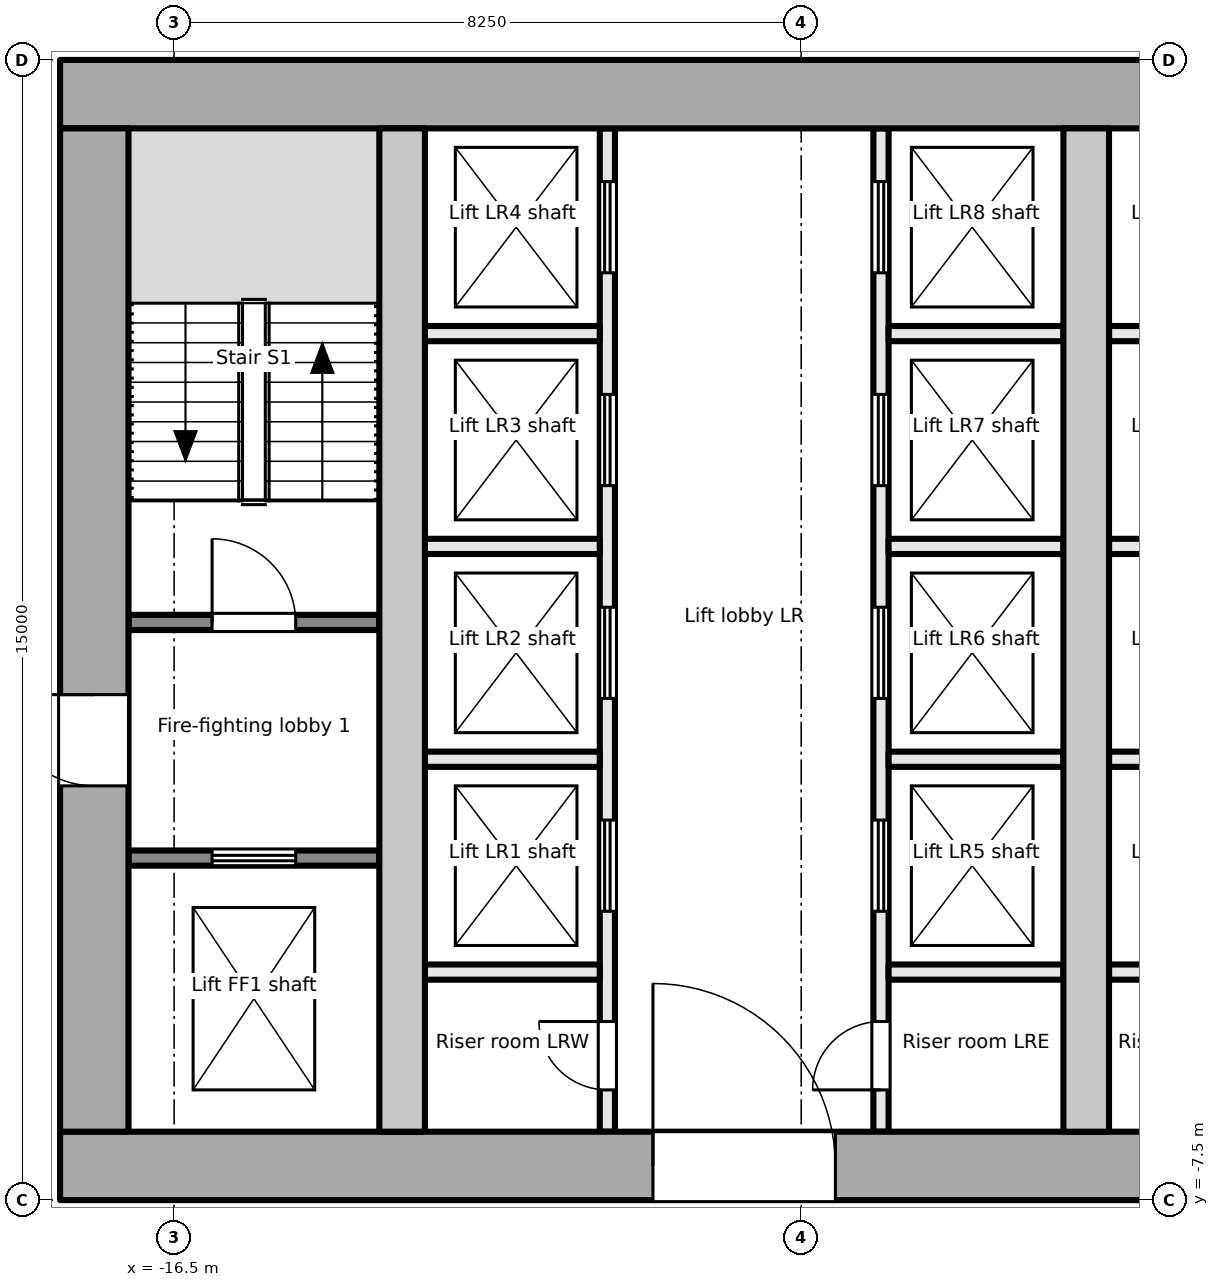
"""IFC4 building model, lengths in metres.
Left out: names, types, materials, properties, quantities, classifications, styles, units other than length and angle.
Written with IfcOpenShell. Run it as: python <this file> out.ifc"""

import sys

from ifc_helpers import new_model, si_unit, direction, frame, frame_2d, origin, place, context, subcontext, project, spatial, rectangle, extrude, element, fill, save


model = new_model("IFC4")
c1 = context("Model", 3, precision=1e-05, world=origin(), true_north=direction((0.0, 1.0)))
c2 = subcontext(c1, "Body", "Model", "MODEL_VIEW")
j1 = project(units=[si_unit("LENGTHUNIT", "METRE"), si_unit("PLANEANGLEUNIT", "RADIAN")], contexts=[c1])
p1 = place(None, origin())
s1 = spatial("IfcSite", under=j1, at=p1, CompositionType="ELEMENT")
p2 = place(p1, origin())
s2 = spatial("IfcBuilding", under=s1, at=p2, CompositionType="ELEMENT")
p3 = place(p2, frame((0.0, 0.0, 40.6)))
s3 = spatial("IfcBuildingStorey", under=s2, at=p3, CompositionType="ELEMENT", Elevation=40.6)
p4 = place(p3, frame((-18.0, -7.05, -0.2), z_axis=(0.0, 0.0, 1.0), x_axis=(1.0, 0.0, 0.0)))
e1 = element("IfcWall", 1, at=p4, inside=s3, PredefinedType="SHEAR", context=c2, shape_type="SweptSolid", body=[
    extrude(rectangle(XDim=36.0, YDim=0.9, at=frame_2d((18.0, 0.0))), origin(), (0.0, 0.0, 1.0), 4.1),
])
p5 = place(p4, frame((7.8, 0.0, 0.2)))
e2 = element("IfcOpeningElement", 2, at=p5, cuts=e1, PredefinedType="OPENING", context=c2, shape_type="SweptSolid", body=[
    extrude(rectangle(XDim=2.4, YDim=2.1, at=frame_2d((1.2, 1.05))), frame((0.0, 0.46, 0.0), z_axis=(0.0, -1.0, 0.0), x_axis=(1.0, 0.0, 0.0)), (0.0, 0.0, 1.0), 0.921),
])
p6 = place(p4, frame((17.4, 0.0, 0.2)))
e3 = element("IfcOpeningElement", 3, at=p6, cuts=e1, PredefinedType="OPENING", context=c2, shape_type="SweptSolid", body=[
    extrude(rectangle(XDim=1.2, YDim=2.1, at=frame_2d((0.6, 1.05))), frame((0.0, 0.46, 0.0), z_axis=(0.0, -1.0, 0.0), x_axis=(1.0, 0.0, 0.0)), (0.0, 0.0, 1.0), 0.921),
])
p7 = place(p4, frame((26.1, 0.0, 0.2)))
e4 = element("IfcOpeningElement", 4, at=p7, cuts=e1, PredefinedType="OPENING", context=c2, shape_type="SweptSolid", body=[
    extrude(rectangle(XDim=2.4, YDim=2.1, at=frame_2d((1.2, 1.05))), frame((0.0, 0.46, 0.0), z_axis=(0.0, -1.0, 0.0), x_axis=(1.0, 0.0, 0.0)), (0.0, 0.0, 1.0), 0.921),
])
p8 = place(p3, frame((-18.0, 7.05, -0.2), z_axis=(0.0, 0.0, 1.0), x_axis=(1.0, 0.0, 0.0)))
e5 = element("IfcWall", 5, at=p8, inside=s3, PredefinedType="SHEAR", context=c2, shape_type="SweptSolid", body=[
    extrude(rectangle(XDim=36.0, YDim=0.9, at=frame_2d((18.0, 0.0))), origin(), (0.0, 0.0, 1.0), 4.1),
])
p9 = place(p3, frame((-17.55, -6.6, -0.2), z_axis=(0.0, 0.0, 1.0), x_axis=(0.0, 1.0, 0.0)))
e6 = element("IfcWall", 6, at=p9, inside=s3, PredefinedType="SHEAR", context=c2, shape_type="SweptSolid", body=[
    extrude(rectangle(XDim=13.2, YDim=0.9, at=frame_2d((6.6, 0.0))), origin(), (0.0, 0.0, 1.0), 4.1),
])
p10 = place(p9, frame((4.55, 0.0, 0.2)))
e7 = element("IfcOpeningElement", 7, at=p10, cuts=e6, PredefinedType="OPENING", context=c2, shape_type="SweptSolid", body=[
    extrude(rectangle(XDim=1.2, YDim=2.1, at=frame_2d((0.6, 1.05))), frame((0.0, 0.46, 0.0), z_axis=(0.0, -1.0, 0.0), x_axis=(1.0, 0.0, 0.0)), (0.0, 0.0, 1.0), 0.921),
])
for number, where, z_axis, x_axis in (
    (8, (-13.5, -6.6, -0.2), (0.0, 0.0, 1.0), (0.0, 1.0, 0.0)),
    (9, (-4.5, -6.6, -0.2), (0.0, 0.0, 1.0), (0.0, 1.0, 0.0)),
):
    element("IfcWall", number, at=place(p3, frame(where, z_axis=z_axis, x_axis=x_axis)), inside=s3, PredefinedType="SHEAR", context=c2, shape_type="SweptSolid", body=[
        extrude(rectangle(XDim=13.2, YDim=0.6, at=frame_2d((6.6, 0.0))), origin(), (0.0, 0.0, 1.0), 4.1),
    ])
p11 = place(p3, frame((-17.1, -3.0, 0.0), z_axis=(0.0, 0.0, 1.0), x_axis=(1.0, 0.0, 0.0)))
e10 = element("IfcWall", 10, at=p11, inside=s3, PredefinedType="PARTITIONING", context=c2, shape_type="SweptSolid", body=[
    extrude(rectangle(XDim=3.3, YDim=0.2, at=frame_2d((1.65, 0.0))), origin(), (0.0, 0.0, 1.0), 3.9),
])
p12 = place(p11, frame((1.1, 0.0, 0.0)))
e11 = element("IfcOpeningElement", 11, at=p12, cuts=e10, PredefinedType="OPENING", context=c2, shape_type="SweptSolid", body=[
    extrude(rectangle(XDim=1.1, YDim=2.1, at=frame_2d((0.55, 1.05))), frame((0.0, 0.111, 0.0), z_axis=(0.0, -1.0, 0.0), x_axis=(1.0, 0.0, 0.0)), (0.0, 0.0, 1.0), 0.221),
])
p13 = place(p3, frame((-17.1, 0.1, 0.0), z_axis=(0.0, 0.0, 1.0), x_axis=(1.0, 0.0, 0.0)))
e12 = element("IfcWall", 12, at=p13, inside=s3, PredefinedType="PARTITIONING", context=c2, shape_type="SweptSolid", body=[
    extrude(rectangle(XDim=3.3, YDim=0.2, at=frame_2d((1.65, 0.0))), origin(), (0.0, 0.0, 1.0), 3.9),
])
p14 = place(p13, frame((1.1, 0.0, 0.0)))
e13 = element("IfcOpeningElement", 13, at=p14, cuts=e12, PredefinedType="OPENING", context=c2, shape_type="SweptSolid", body=[
    extrude(rectangle(XDim=1.1, YDim=2.1, at=frame_2d((0.55, 1.05))), frame((0.0, 0.111, 0.0), z_axis=(0.0, -1.0, 0.0), x_axis=(1.0, 0.0, 0.0)), (0.0, 0.0, 1.0), 0.221),
])
p15 = place(p3, frame((-10.8, -6.6, 0.0), z_axis=(0.0, 0.0, 1.0), x_axis=(0.0, 1.0, 0.0)))
e14 = element("IfcWall", 14, at=p15, inside=s3, PredefinedType="PARTITIONING", context=c2, shape_type="SweptSolid", body=[
    extrude(rectangle(XDim=13.2, YDim=0.2, at=frame_2d((6.6, 0.0))), origin(), (0.0, 0.0, 1.0), 3.9),
])
p16 = place(p15, frame((0.55, 0.0, 0.0)))
e15 = element("IfcOpeningElement", 15, at=p16, cuts=e14, PredefinedType="OPENING", context=c2, shape_type="SweptSolid", body=[
    extrude(rectangle(XDim=0.9, YDim=2.1, at=frame_2d((0.45, 1.05))), frame((0.0, 0.111, 0.0), z_axis=(0.0, -1.0, 0.0), x_axis=(1.0, 0.0, 0.0)), (0.0, 0.0, 1.0), 0.221),
])
p17 = place(p15, frame((2.9, 0.0, 0.0)))
e16 = element("IfcOpeningElement", 16, at=p17, cuts=e14, PredefinedType="OPENING", context=c2, shape_type="SweptSolid", body=[
    extrude(rectangle(XDim=1.2, YDim=2.1, at=frame_2d((0.6, 1.05))), frame((0.0, 0.111, 0.0), z_axis=(0.0, -1.0, 0.0), x_axis=(1.0, 0.0, 0.0)), (0.0, 0.0, 1.0), 0.221),
])
p18 = place(p15, frame((5.7, 0.0, 0.0)))
e17 = element("IfcOpeningElement", 17, at=p18, cuts=e14, PredefinedType="OPENING", context=c2, shape_type="SweptSolid", body=[
    extrude(rectangle(XDim=1.2, YDim=2.1, at=frame_2d((0.6, 1.05))), frame((0.0, 0.111, 0.0), z_axis=(0.0, -1.0, 0.0), x_axis=(1.0, 0.0, 0.0)), (0.0, 0.0, 1.0), 0.221),
])
p19 = place(p15, frame((8.5, 0.0, 0.0)))
e18 = element("IfcOpeningElement", 18, at=p19, cuts=e14, PredefinedType="OPENING", context=c2, shape_type="SweptSolid", body=[
    extrude(rectangle(XDim=1.2, YDim=2.1, at=frame_2d((0.6, 1.05))), frame((0.0, 0.111, 0.0), z_axis=(0.0, -1.0, 0.0), x_axis=(1.0, 0.0, 0.0)), (0.0, 0.0, 1.0), 0.221),
])
p20 = place(p15, frame((11.3, 0.0, 0.0)))
e19 = element("IfcOpeningElement", 19, at=p20, cuts=e14, PredefinedType="OPENING", context=c2, shape_type="SweptSolid", body=[
    extrude(rectangle(XDim=1.2, YDim=2.1, at=frame_2d((0.6, 1.05))), frame((0.0, 0.111, 0.0), z_axis=(0.0, -1.0, 0.0), x_axis=(1.0, 0.0, 0.0)), (0.0, 0.0, 1.0), 0.221),
])
p21 = place(p3, frame((-7.2, -6.6, 0.0), z_axis=(0.0, 0.0, 1.0), x_axis=(0.0, 1.0, 0.0)))
e20 = element("IfcWall", 20, at=p21, inside=s3, PredefinedType="PARTITIONING", context=c2, shape_type="SweptSolid", body=[
    extrude(rectangle(XDim=13.2, YDim=0.2, at=frame_2d((6.6, 0.0))), origin(), (0.0, 0.0, 1.0), 3.9),
])
p22 = place(p21, frame((0.55, 0.0, 0.0)))
e21 = element("IfcOpeningElement", 21, at=p22, cuts=e20, PredefinedType="OPENING", context=c2, shape_type="SweptSolid", body=[
    extrude(rectangle(XDim=0.9, YDim=2.1, at=frame_2d((0.45, 1.05))), frame((0.0, 0.111, 0.0), z_axis=(0.0, -1.0, 0.0), x_axis=(1.0, 0.0, 0.0)), (0.0, 0.0, 1.0), 0.221),
])
p23 = place(p21, frame((2.9, 0.0, 0.0)))
e22 = element("IfcOpeningElement", 22, at=p23, cuts=e20, PredefinedType="OPENING", context=c2, shape_type="SweptSolid", body=[
    extrude(rectangle(XDim=1.2, YDim=2.1, at=frame_2d((0.6, 1.05))), frame((0.0, 0.111, 0.0), z_axis=(0.0, -1.0, 0.0), x_axis=(1.0, 0.0, 0.0)), (0.0, 0.0, 1.0), 0.221),
])
p24 = place(p21, frame((5.7, 0.0, 0.0)))
e23 = element("IfcOpeningElement", 23, at=p24, cuts=e20, PredefinedType="OPENING", context=c2, shape_type="SweptSolid", body=[
    extrude(rectangle(XDim=1.2, YDim=2.1, at=frame_2d((0.6, 1.05))), frame((0.0, 0.111, 0.0), z_axis=(0.0, -1.0, 0.0), x_axis=(1.0, 0.0, 0.0)), (0.0, 0.0, 1.0), 0.221),
])
p25 = place(p21, frame((8.5, 0.0, 0.0)))
e24 = element("IfcOpeningElement", 24, at=p25, cuts=e20, PredefinedType="OPENING", context=c2, shape_type="SweptSolid", body=[
    extrude(rectangle(XDim=1.2, YDim=2.1, at=frame_2d((0.6, 1.05))), frame((0.0, 0.111, 0.0), z_axis=(0.0, -1.0, 0.0), x_axis=(1.0, 0.0, 0.0)), (0.0, 0.0, 1.0), 0.221),
])
p26 = place(p21, frame((11.3, 0.0, 0.0)))
e25 = element("IfcOpeningElement", 25, at=p26, cuts=e20, PredefinedType="OPENING", context=c2, shape_type="SweptSolid", body=[
    extrude(rectangle(XDim=1.2, YDim=2.1, at=frame_2d((0.6, 1.05))), frame((0.0, 0.111, 0.0), z_axis=(0.0, -1.0, 0.0), x_axis=(1.0, 0.0, 0.0)), (0.0, 0.0, 1.0), 0.221),
])
for number, where, z_axis, x_axis in (
    (26, (-13.2, -1.7, 0.0), (0.0, 0.0, 1.0), (1.0, 0.0, 0.0)),
    (27, (-13.2, 1.1, 0.0), (0.0, 0.0, 1.0), (1.0, 0.0, 0.0)),
    (28, (-13.2, 3.9, 0.0), (0.0, 0.0, 1.0), (1.0, 0.0, 0.0)),
    (29, (-13.2, -4.5, 0.0), (0.0, 0.0, 1.0), (1.0, 0.0, 0.0)),
    (30, (-7.1, -1.7, 0.0), (0.0, 0.0, 1.0), (1.0, 0.0, 0.0)),
    (31, (-7.1, 1.1, 0.0), (0.0, 0.0, 1.0), (1.0, 0.0, 0.0)),
    (32, (-7.1, 3.9, 0.0), (0.0, 0.0, 1.0), (1.0, 0.0, 0.0)),
    (33, (-7.1, -4.5, 0.0), (0.0, 0.0, 1.0), (1.0, 0.0, 0.0)),
    (34, (-4.2, -1.7, 0.0), (0.0, 0.0, 1.0), (1.0, 0.0, 0.0)),
    (35, (-4.2, 1.1, 0.0), (0.0, 0.0, 1.0), (1.0, 0.0, 0.0)),
    (36, (-4.2, 3.9, 0.0), (0.0, 0.0, 1.0), (1.0, 0.0, 0.0)),
    (37, (-4.2, -4.5, 0.0), (0.0, 0.0, 1.0), (1.0, 0.0, 0.0)),
):
    element("IfcWall", number, at=place(p3, frame(where, z_axis=z_axis, x_axis=x_axis)), inside=s3, PredefinedType="PARTITIONING", context=c2, shape_type="SweptSolid", body=[
        extrude(rectangle(XDim=2.3, YDim=0.2, at=frame_2d((1.15, 0.0))), origin(), (0.0, 0.0, 1.0), 3.9),
    ])
p27 = place(p12, origin())
e38 = element("IfcDoor", 38, at=p27, inside=s3, OperationType="DOUBLE_DOOR_SLIDING", PredefinedType="DOOR", context=c2, shape_type="SweptSolid", body=[
    extrude(rectangle(XDim=1.1, YDim=2.1, at=frame_2d((0.55, 1.05))), frame((0.0, 0.025, 0.0), z_axis=(0.0, -1.0, 0.0), x_axis=(1.0, 0.0, 0.0)), (0.0, 0.0, 1.0), 0.05),
])
fill(e11, e38)
p28 = place(p10, origin())
e39 = element("IfcDoor", 39, at=p28, inside=s3, OperationType="SINGLE_SWING_RIGHT", PredefinedType="DOOR", context=c2, shape_type="SweptSolid", body=[
    extrude(rectangle(XDim=1.2, YDim=2.1, at=frame_2d((0.6, 1.05))), frame((0.0, 0.025, 0.0), z_axis=(0.0, -1.0, 0.0), x_axis=(1.0, 0.0, 0.0)), (0.0, 0.0, 1.0), 0.05),
])
fill(e7, e39)
p29 = place(p14, origin())
e40 = element("IfcDoor", 40, at=p29, inside=s3, OperationType="SINGLE_SWING_LEFT", PredefinedType="DOOR", context=c2, shape_type="SweptSolid", body=[
    extrude(rectangle(XDim=1.1, YDim=2.1, at=frame_2d((0.55, 1.05))), frame((0.0, 0.025, 0.0), z_axis=(0.0, -1.0, 0.0), x_axis=(1.0, 0.0, 0.0)), (0.0, 0.0, 1.0), 0.05),
])
fill(e13, e40)
p30 = place(p16, origin())
e41 = element("IfcDoor", 41, at=p30, inside=s3, OperationType="SINGLE_SWING_RIGHT", PredefinedType="DOOR", context=c2, shape_type="SweptSolid", body=[
    extrude(rectangle(XDim=0.9, YDim=2.1, at=frame_2d((0.45, 1.05))), frame((0.0, 0.025, 0.0), z_axis=(0.0, -1.0, 0.0), x_axis=(1.0, 0.0, 0.0)), (0.0, 0.0, 1.0), 0.05),
])
fill(e15, e41)
p31 = place(p17, origin())
e42 = element("IfcDoor", 42, at=p31, inside=s3, OperationType="DOUBLE_DOOR_SLIDING", PredefinedType="DOOR", context=c2, shape_type="SweptSolid", body=[
    extrude(rectangle(XDim=1.2, YDim=2.1, at=frame_2d((0.6, 1.05))), frame((0.0, 0.025, 0.0), z_axis=(0.0, -1.0, 0.0), x_axis=(1.0, 0.0, 0.0)), (0.0, 0.0, 1.0), 0.05),
])
fill(e16, e42)
p32 = place(p18, origin())
e43 = element("IfcDoor", 43, at=p32, inside=s3, OperationType="DOUBLE_DOOR_SLIDING", PredefinedType="DOOR", context=c2, shape_type="SweptSolid", body=[
    extrude(rectangle(XDim=1.2, YDim=2.1, at=frame_2d((0.6, 1.05))), frame((0.0, 0.025, 0.0), z_axis=(0.0, -1.0, 0.0), x_axis=(1.0, 0.0, 0.0)), (0.0, 0.0, 1.0), 0.05),
])
fill(e17, e43)
p33 = place(p19, origin())
e44 = element("IfcDoor", 44, at=p33, inside=s3, OperationType="DOUBLE_DOOR_SLIDING", PredefinedType="DOOR", context=c2, shape_type="SweptSolid", body=[
    extrude(rectangle(XDim=1.2, YDim=2.1, at=frame_2d((0.6, 1.05))), frame((0.0, 0.025, 0.0), z_axis=(0.0, -1.0, 0.0), x_axis=(1.0, 0.0, 0.0)), (0.0, 0.0, 1.0), 0.05),
])
fill(e18, e44)
p34 = place(p20, origin())
e45 = element("IfcDoor", 45, at=p34, inside=s3, OperationType="DOUBLE_DOOR_SLIDING", PredefinedType="DOOR", context=c2, shape_type="SweptSolid", body=[
    extrude(rectangle(XDim=1.2, YDim=2.1, at=frame_2d((0.6, 1.05))), frame((0.0, 0.025, 0.0), z_axis=(0.0, -1.0, 0.0), x_axis=(1.0, 0.0, 0.0)), (0.0, 0.0, 1.0), 0.05),
])
fill(e19, e45)
p35 = place(p22, origin())
e46 = element("IfcDoor", 46, at=p35, inside=s3, OperationType="SINGLE_SWING_LEFT", PredefinedType="DOOR", context=c2, shape_type="SweptSolid", body=[
    extrude(rectangle(XDim=0.9, YDim=2.1, at=frame_2d((0.45, 1.05))), frame((0.0, 0.025, 0.0), z_axis=(0.0, -1.0, 0.0), x_axis=(1.0, 0.0, 0.0)), (0.0, 0.0, 1.0), 0.05),
])
fill(e21, e46)
p36 = place(p23, origin())
e47 = element("IfcDoor", 47, at=p36, inside=s3, OperationType="DOUBLE_DOOR_SLIDING", PredefinedType="DOOR", context=c2, shape_type="SweptSolid", body=[
    extrude(rectangle(XDim=1.2, YDim=2.1, at=frame_2d((0.6, 1.05))), frame((0.0, 0.025, 0.0), z_axis=(0.0, -1.0, 0.0), x_axis=(1.0, 0.0, 0.0)), (0.0, 0.0, 1.0), 0.05),
])
fill(e22, e47)
p37 = place(p24, origin())
e48 = element("IfcDoor", 48, at=p37, inside=s3, OperationType="DOUBLE_DOOR_SLIDING", PredefinedType="DOOR", context=c2, shape_type="SweptSolid", body=[
    extrude(rectangle(XDim=1.2, YDim=2.1, at=frame_2d((0.6, 1.05))), frame((0.0, 0.025, 0.0), z_axis=(0.0, -1.0, 0.0), x_axis=(1.0, 0.0, 0.0)), (0.0, 0.0, 1.0), 0.05),
])
fill(e23, e48)
p38 = place(p25, origin())
e49 = element("IfcDoor", 49, at=p38, inside=s3, OperationType="DOUBLE_DOOR_SLIDING", PredefinedType="DOOR", context=c2, shape_type="SweptSolid", body=[
    extrude(rectangle(XDim=1.2, YDim=2.1, at=frame_2d((0.6, 1.05))), frame((0.0, 0.025, 0.0), z_axis=(0.0, -1.0, 0.0), x_axis=(1.0, 0.0, 0.0)), (0.0, 0.0, 1.0), 0.05),
])
fill(e24, e49)
p39 = place(p26, origin())
e50 = element("IfcDoor", 50, at=p39, inside=s3, OperationType="DOUBLE_DOOR_SLIDING", PredefinedType="DOOR", context=c2, shape_type="SweptSolid", body=[
    extrude(rectangle(XDim=1.2, YDim=2.1, at=frame_2d((0.6, 1.05))), frame((0.0, 0.025, 0.0), z_axis=(0.0, -1.0, 0.0), x_axis=(1.0, 0.0, 0.0)), (0.0, 0.0, 1.0), 0.05),
])
fill(e25, e50)
p40 = place(p5, origin())
e51 = element("IfcDoor", 51, at=p40, inside=s3, OperationType="DOUBLE_DOOR_DOUBLE_SWING", PredefinedType="DOOR", context=c2, shape_type="SweptSolid", body=[
    extrude(rectangle(XDim=2.4, YDim=2.1, at=frame_2d((1.2, 1.05))), frame((0.0, 0.025, 0.0), z_axis=(0.0, -1.0, 0.0), x_axis=(1.0, 0.0, 0.0)), (0.0, 0.0, 1.0), 0.05),
])
fill(e2, e51)
save(model, sys.argv[1])
